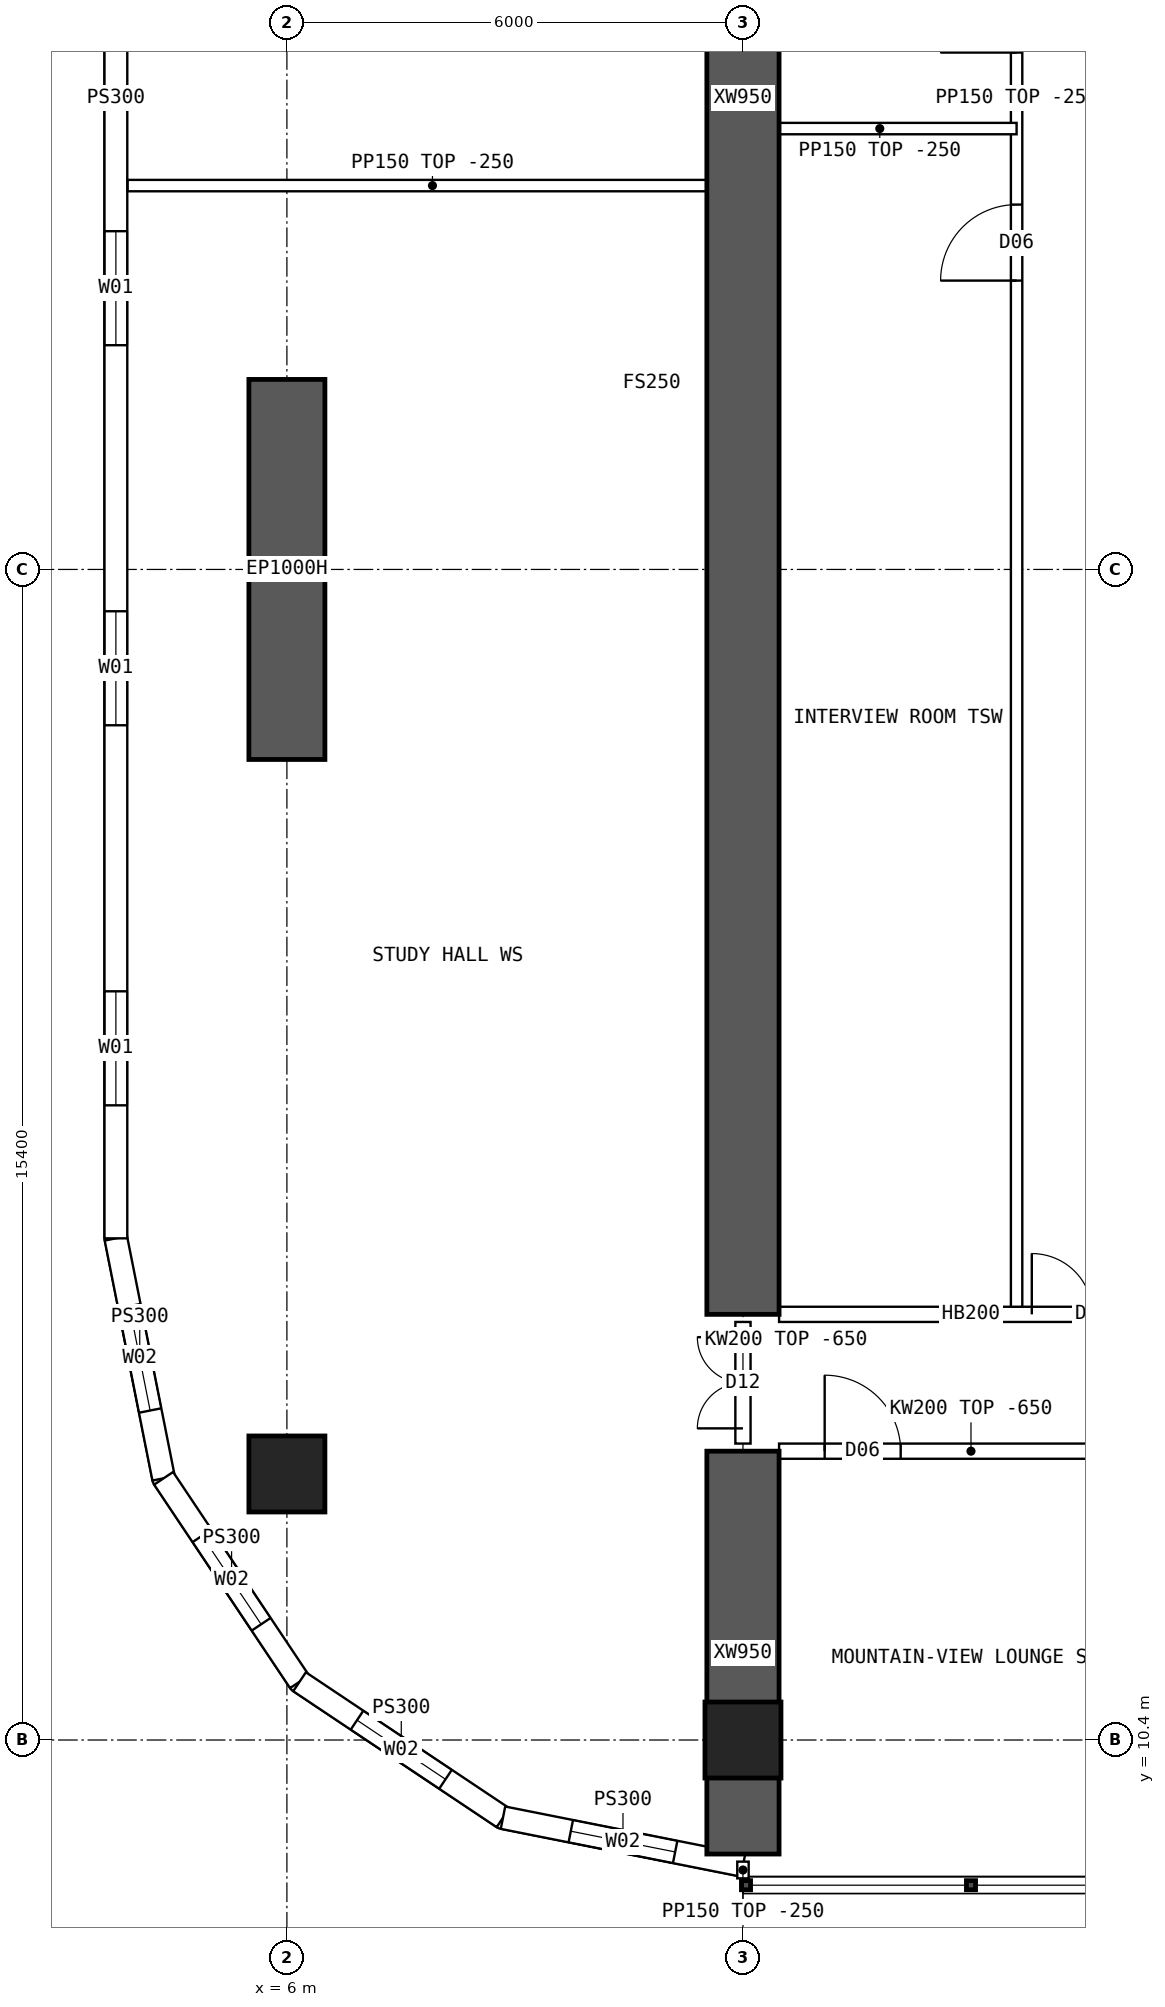
"""IFC4 building model, lengths in metres.
Left out: names, types, materials, properties, quantities, classifications, styles, units other than length and angle.
Written with IfcOpenShell. Run it as: python <this file> out.ifc"""

import sys

from ifc_helpers import new_model, si_unit, direction, frame, frame_2d, origin, origin_2d, place, context, subcontext, project, spatial, polyline, rectangle, hollow_rectangle, outline, extrude, element, fill, save


model = new_model("IFC4")
c1 = context("Model", 3, precision=1e-05, world=origin(), true_north=direction((0.0, 1.0)))
c2 = subcontext(c1, "Body", "Model", "MODEL_VIEW")
j1 = project(units=[si_unit("LENGTHUNIT", "METRE"), si_unit("PLANEANGLEUNIT", "RADIAN")], contexts=[c1])
p1 = place(None, origin())
s1 = spatial("IfcSite", under=j1, at=p1, CompositionType="ELEMENT")
p2 = place(p1, origin())
s2 = spatial("IfcBuilding", under=s1, at=p2, CompositionType="ELEMENT")
p3 = place(p2, frame((0.0, 0.0, 91.9)))
s3 = spatial("IfcBuildingStorey", under=s2, at=p3, CompositionType="ELEMENT", Elevation=91.9)
for number, where, z_axis, x_axis in (
    (1, (12.0, 10.4, 0.0), (0.0, 0.0, 1.0), (1.0, 0.0, 0.0)),
    (2, (6.0, 13.9, 0.0), (0.0, 0.0, 1.0), (1.0, 0.0, 0.0)),
):
    element("IfcColumn", number, at=place(p3, frame(where, z_axis=z_axis, x_axis=x_axis)), inside=s3, PredefinedType="COLUMN", context=c2, shape_type="SweptSolid", body=[
        extrude(hollow_rectangle(XDim=1.0, YDim=1.0, WallThickness=0.1, at=origin_2d()), origin(), (0.0, 0.0, 1.0), 3.75),
    ])
p4 = place(p3, frame((6.0, 23.3, 0.0), z_axis=(0.0, 0.0, 1.0), x_axis=(0.0, 1.0, 0.0)))
e3 = element("IfcWall", 3, at=p4, inside=s3, PredefinedType="SHEAR", context=c2, shape_type="SweptSolid", body=[
    extrude(rectangle(XDim=5.0, YDim=1.0, at=frame_2d((2.5, 0.0))), origin(), (0.0, 0.0, 1.0), 3.75),
])
p5 = place(p3, frame((12.0, 8.9, 0.0), z_axis=(0.0, 0.0, 1.0), x_axis=(0.0, 1.0, 0.0)))
e4 = element("IfcWall", 4, at=p5, inside=s3, PredefinedType="SHEAR", context=c2, shape_type="SweptSolid", body=[
    extrude(rectangle(XDim=5.3, YDim=0.95, at=frame_2d((2.65, 0.0))), origin(), (0.0, 0.0, 1.0), 3.75),
])
p6 = place(p3, frame((12.0, 16.0, 0.0), z_axis=(0.0, 0.0, 1.0), x_axis=(0.0, 1.0, 0.0)))
e5 = element("IfcWall", 5, at=p6, inside=s3, PredefinedType="SHEAR", context=c2, shape_type="SweptSolid", body=[
    extrude(rectangle(XDim=32.0, YDim=0.95, at=frame_2d((16.0, 0.0))), origin(), (0.0, 0.0, 1.0), 3.75),
])
p7 = place(p3, frame((3.75, 47.0, 0.0), z_axis=(0.0, 0.0, 1.0), x_axis=(0.0, -1.0, 0.0)))
e6 = element("IfcWall", 6, at=p7, inside=s3, PredefinedType="SOLIDWALL", context=c2, shape_type="SweptSolid", body=[
    extrude(outline(polyline([(-0.015, -0.15), (30.015, -0.15), (29.985, 0.15), (0.015, 0.15), (-0.015, -0.15)])), origin(), (0.0, 0.0, 1.0), 3.5),
])
p8 = place(p7, frame((1.75, 0.0, 0.9)))
e7 = element("IfcOpeningElement", 7, at=p8, cuts=e6, PredefinedType="OPENING", context=c2, shape_type="SweptSolid", body=[
    extrude(rectangle(XDim=1.5, YDim=2.0, at=frame_2d((0.75, 1.0))), frame((0.0, 0.16, 0.0), z_axis=(0.0, -1.0, 0.0), x_axis=(1.0, 0.0, 0.0)), (0.0, 0.0, 1.0), 0.32),
])
p9 = place(p7, frame((6.75, 0.0, 0.9)))
e8 = element("IfcOpeningElement", 8, at=p9, cuts=e6, PredefinedType="OPENING", context=c2, shape_type="SweptSolid", body=[
    extrude(rectangle(XDim=1.5, YDim=2.0, at=frame_2d((0.75, 1.0))), frame((0.0, 0.16, 0.0), z_axis=(0.0, -1.0, 0.0), x_axis=(1.0, 0.0, 0.0)), (0.0, 0.0, 1.0), 0.32),
])
p10 = place(p7, frame((11.75, 0.0, 0.9)))
e9 = element("IfcOpeningElement", 9, at=p10, cuts=e6, PredefinedType="OPENING", context=c2, shape_type="SweptSolid", body=[
    extrude(rectangle(XDim=1.5, YDim=2.0, at=frame_2d((0.75, 1.0))), frame((0.0, 0.16, 0.0), z_axis=(0.0, -1.0, 0.0), x_axis=(1.0, 0.0, 0.0)), (0.0, 0.0, 1.0), 0.32),
])
p11 = place(p7, frame((16.75, 0.0, 0.9)))
e10 = element("IfcOpeningElement", 10, at=p11, cuts=e6, PredefinedType="OPENING", context=c2, shape_type="SweptSolid", body=[
    extrude(rectangle(XDim=1.5, YDim=2.0, at=frame_2d((0.75, 1.0))), frame((0.0, 0.16, 0.0), z_axis=(0.0, -1.0, 0.0), x_axis=(1.0, 0.0, 0.0)), (0.0, 0.0, 1.0), 0.32),
])
p12 = place(p7, frame((21.75, 0.0, 0.9)))
e11 = element("IfcOpeningElement", 11, at=p12, cuts=e6, PredefinedType="OPENING", context=c2, shape_type="SweptSolid", body=[
    extrude(rectangle(XDim=1.5, YDim=2.0, at=frame_2d((0.75, 1.0))), frame((0.0, 0.16, 0.0), z_axis=(0.0, -1.0, 0.0), x_axis=(1.0, 0.0, 0.0)), (0.0, 0.0, 1.0), 0.32),
])
p13 = place(p7, frame((26.75, 0.0, 0.9)))
e12 = element("IfcOpeningElement", 12, at=p13, cuts=e6, PredefinedType="OPENING", context=c2, shape_type="SweptSolid", body=[
    extrude(rectangle(XDim=1.5, YDim=2.0, at=frame_2d((0.75, 1.0))), frame((0.0, 0.16, 0.0), z_axis=(0.0, -1.0, 0.0), x_axis=(1.0, 0.0, 0.0)), (0.0, 0.0, 1.0), 0.32),
])
p14 = place(p3, frame((3.75, 17.0, 0.0), z_axis=(0.0, 0.0, 1.0), x_axis=(0.195080412259, -0.980787251524, 0.0)))
e13 = element("IfcWall", 13, at=p14, inside=s3, PredefinedType="SOLIDWALL", context=c2, shape_type="SweptSolid", body=[
    extrude(outline(polyline([(-0.015, -0.15), (3.249, -0.15), (3.189, 0.15), (0.015, 0.15), (-0.015, -0.15)])), origin(), (0.0, 0.0, 1.0), 3.5),
])
p15 = place(p14, frame((0.909, 0.0, 0.9)))
e14 = element("IfcOpeningElement", 14, at=p15, cuts=e13, PredefinedType="OPENING", context=c2, shape_type="SweptSolid", body=[
    extrude(rectangle(XDim=1.4, YDim=1.8, at=frame_2d((0.7, 0.9))), frame((0.0, 0.16, 0.0), z_axis=(0.0, -1.0, 0.0), x_axis=(1.0, 0.0, 0.0)), (0.0, 0.0, 1.0), 0.32),
])
p16 = place(p3, frame((4.378, 13.843, 0.0), z_axis=(0.0, 0.0, 1.0), x_axis=(0.555609954424, -0.831443069936, 0.0)))
e15 = element("IfcWall", 15, at=p16, inside=s3, PredefinedType="SOLIDWALL", context=c2, shape_type="SweptSolid", body=[
    extrude(outline(polyline([(-0.03, -0.15), (3.249, -0.15), (3.189, 0.15), (0.03, 0.15), (-0.03, -0.15)])), origin(), (0.0, 0.0, 1.0), 3.5),
])
p17 = place(p16, frame((0.909, 0.0, 0.9)))
e16 = element("IfcOpeningElement", 16, at=p17, cuts=e15, PredefinedType="OPENING", context=c2, shape_type="SweptSolid", body=[
    extrude(rectangle(XDim=1.4, YDim=1.8, at=frame_2d((0.7, 0.9))), frame((0.0, 0.16, 0.0), z_axis=(0.0, -1.0, 0.0), x_axis=(1.0, 0.0, 0.0)), (0.0, 0.0, 1.0), 0.32),
])
p18 = place(p3, frame((6.167, 11.167, 0.0), z_axis=(0.0, 0.0, 1.0), x_axis=(0.831443069936, -0.555609954424, 0.0)))
e17 = element("IfcWall", 17, at=p18, inside=s3, PredefinedType="SOLIDWALL", context=c2, shape_type="SweptSolid", body=[
    extrude(outline(polyline([(-0.03, -0.15), (3.249, -0.15), (3.189, 0.15), (0.03, 0.15), (-0.03, -0.15)])), origin(), (0.0, 0.0, 1.0), 3.5),
])
p19 = place(p18, frame((0.909, 0.0, 0.9)))
e18 = element("IfcOpeningElement", 18, at=p19, cuts=e17, PredefinedType="OPENING", context=c2, shape_type="SweptSolid", body=[
    extrude(rectangle(XDim=1.4, YDim=1.8, at=frame_2d((0.7, 0.9))), frame((0.0, 0.16, 0.0), z_axis=(0.0, -1.0, 0.0), x_axis=(1.0, 0.0, 0.0)), (0.0, 0.0, 1.0), 0.32),
])
p20 = place(p3, frame((8.843, 9.378, 0.0), z_axis=(0.0, 0.0, 1.0), x_axis=(0.980787251524, -0.195080412259, 0.0)))
e19 = element("IfcWall", 19, at=p20, inside=s3, PredefinedType="SOLIDWALL", context=c2, shape_type="SweptSolid", body=[
    extrude(outline(polyline([(-0.03, -0.15), (3.249, -0.15), (3.189, 0.15), (0.03, 0.15), (-0.03, -0.15)])), origin(), (0.0, 0.0, 1.0), 3.5),
])
p21 = place(p20, frame((0.909, 0.0, 0.9)))
e20 = element("IfcOpeningElement", 20, at=p21, cuts=e19, PredefinedType="OPENING", context=c2, shape_type="SweptSolid", body=[
    extrude(rectangle(XDim=1.4, YDim=1.8, at=frame_2d((0.7, 0.9))), frame((0.0, 0.16, 0.0), z_axis=(0.0, -1.0, 0.0), x_axis=(1.0, 0.0, 0.0)), (0.0, 0.0, 1.0), 0.32),
])
p22 = place(p3, frame((12.475, 14.2, 0.0), z_axis=(0.0, 0.0, 1.0), x_axis=(1.0, 0.0, 0.0)))
e21 = element("IfcWall", 21, at=p22, inside=s3, PredefinedType="SOLIDWALL", context=c2, shape_type="SweptSolid", body=[
    extrude(outline(polyline([(0.0, 0.0), (5.05, 0.0), (5.05, 3.1), (0.0, 3.1), (0.0, 0.0)])), frame((0.0, 0.1, 0.0), z_axis=(0.0, -1.0, 0.0), x_axis=(1.0, 0.0, 0.0)), (0.0, 0.0, 1.0), 0.2),
])
p23 = place(p22, frame((0.6, 0.0, 0.0)))
e22 = element("IfcOpeningElement", 22, at=p23, cuts=e21, PredefinedType="OPENING", context=c2, shape_type="SweptSolid", body=[
    extrude(rectangle(XDim=1.0, YDim=2.1, at=frame_2d((0.5, 1.05))), frame((0.0, 0.11, 0.0), z_axis=(0.0, -1.0, 0.0), x_axis=(1.0, 0.0, 0.0)), (0.0, 0.0, 1.0), 0.22),
])
p24 = place(p3, frame((12.475, 16.0, 0.0), z_axis=(0.0, 0.0, 1.0), x_axis=(1.0, 0.0, 0.0)))
e23 = element("IfcWall", 23, at=p24, inside=s3, PredefinedType="SOLIDWALL", context=c2, shape_type="SweptSolid", body=[
    extrude(rectangle(XDim=5.05, YDim=0.2, at=frame_2d((2.525, 0.0))), origin(), (0.0, 0.0, 1.0), 3.5),
])
p25 = place(p24, frame((3.325, 0.0, 0.0)))
e24 = element("IfcOpeningElement", 24, at=p25, cuts=e23, PredefinedType="OPENING", context=c2, shape_type="SweptSolid", body=[
    extrude(rectangle(XDim=1.6, YDim=2.1, at=frame_2d((0.8, 1.05))), frame((0.0, 0.11, 0.0), z_axis=(0.0, -1.0, 0.0), x_axis=(1.0, 0.0, 0.0)), (0.0, 0.0, 1.0), 0.22),
])
p26 = place(p3, frame((15.6, 16.1, 0.0), z_axis=(0.0, 0.0, 1.0), x_axis=(0.0, 1.0, 0.0)))
e25 = element("IfcWall", 25, at=p26, inside=s3, PredefinedType="PARTITIONING", context=c2, shape_type="SweptSolid", body=[
    extrude(rectangle(XDim=31.8, YDim=0.15, at=frame_2d((15.9, 0.0))), origin(), (0.0, 0.0, 1.0), 3.5),
])
p27 = place(p26, frame((13.5, 0.0, 0.0)))
e26 = element("IfcOpeningElement", 26, at=p27, cuts=e25, PredefinedType="OPENING", context=c2, shape_type="SweptSolid", body=[
    extrude(rectangle(XDim=1.0, YDim=2.1, at=frame_2d((0.5, 1.05))), frame((0.0, 0.085, 0.0), z_axis=(0.0, -1.0, 0.0), x_axis=(1.0, 0.0, 0.0)), (0.0, 0.0, 1.0), 0.17),
])
p28 = place(p26, frame((16.5, 0.0, 0.0)))
e27 = element("IfcOpeningElement", 27, at=p28, cuts=e25, PredefinedType="OPENING", context=c2, shape_type="SweptSolid", body=[
    extrude(rectangle(XDim=1.0, YDim=2.1, at=frame_2d((0.5, 1.05))), frame((0.0, 0.085, 0.0), z_axis=(0.0, -1.0, 0.0), x_axis=(1.0, 0.0, 0.0)), (0.0, 0.0, 1.0), 0.17),
])
p29 = place(p3, frame((12.0, 31.6, 0.0), z_axis=(0.0, 0.0, 1.0), x_axis=(1.0, 0.0, 0.0)))
e28 = element("IfcWall", 28, at=p29, inside=s3, PredefinedType="PARTITIONING", context=c2, shape_type="SweptSolid", body=[
    extrude(rectangle(XDim=3.6, YDim=0.15, at=frame_2d((1.8, 0.0))), origin(), (0.0, 0.0, 1.0), 3.5),
])
p30 = place(p3, frame((3.905, 30.85, 0.0), z_axis=(0.0, 0.0, 1.0), x_axis=(1.0, 0.0, 0.0)))
e29 = element("IfcWall", 29, at=p30, inside=s3, PredefinedType="PARTITIONING", context=c2, shape_type="SweptSolid", body=[
    extrude(outline(polyline([(0.0, 0.0), (8.02, 0.0), (8.02, 3.5), (2.397, 3.5), (2.395, 3.05), (1.797, 3.05), (1.795, 3.5), (0.0, 3.5), (0.0, 0.0)])), frame((0.0, 0.075, 0.0), z_axis=(0.0, -1.0, 0.0), x_axis=(1.0, 0.0, 0.0)), (0.0, 0.0, 1.0), 0.15),
])
p31 = place(p3, frame((12.0, 14.3, 0.0), z_axis=(0.0, 0.0, 1.0), x_axis=(0.0, 1.0, 0.0)))
e30 = element("IfcWall", 30, at=p31, inside=s3, PredefinedType="SOLIDWALL", context=c2, shape_type="SweptSolid", body=[
    extrude(outline(polyline([(0.0, 0.0), (1.6, 0.0), (1.6, 3.1), (0.0, 3.1), (0.0, 0.0)])), frame((0.0, 0.1, 0.0), z_axis=(0.0, -1.0, 0.0), x_axis=(1.0, 0.0, 0.0)), (0.0, 0.0, 1.0), 0.2),
])
p32 = place(p31, frame((0.2, 0.0, 0.0)))
e31 = element("IfcOpeningElement", 31, at=p32, cuts=e30, PredefinedType="OPENING", context=c2, shape_type="SweptSolid", body=[
    extrude(rectangle(XDim=1.2, YDim=2.1, at=frame_2d((0.6, 1.05))), frame((0.0, 0.11, 0.0), z_axis=(0.0, -1.0, 0.0), x_axis=(1.0, 0.0, 0.0)), (0.0, 0.0, 1.0), 0.22),
])
p33 = place(p3, frame((12.0, 8.8, 0.0), z_axis=(0.0, 0.0, 1.0), x_axis=(0.0, -1.0, 0.0)))
e32 = element("IfcWall", 32, at=p33, inside=s3, PredefinedType="PARTITIONING", context=c2, shape_type="SweptSolid", body=[
    extrude(rectangle(XDim=0.22, YDim=0.15, at=frame_2d((0.11, 0.0))), origin(), (0.0, 0.0, 1.0), 3.5),
])
p34 = place(p11, origin())
e33 = element("IfcWindow", 33, at=p34, inside=s3, PartitioningType="SINGLE_PANEL", PredefinedType="WINDOW", context=c2, shape_type="SweptSolid", body=[
    extrude(rectangle(XDim=1.5, YDim=2.0, at=frame_2d((0.75, 1.0))), frame((0.0, 0.03, 0.0), z_axis=(0.0, -1.0, 0.0), x_axis=(1.0, 0.0, 0.0)), (0.0, 0.0, 1.0), 0.06),
])
fill(e10, e33)
p35 = place(p12, origin())
e34 = element("IfcWindow", 34, at=p35, inside=s3, PartitioningType="SINGLE_PANEL", PredefinedType="WINDOW", context=c2, shape_type="SweptSolid", body=[
    extrude(rectangle(XDim=1.5, YDim=2.0, at=frame_2d((0.75, 1.0))), frame((0.0, 0.03, 0.0), z_axis=(0.0, -1.0, 0.0), x_axis=(1.0, 0.0, 0.0)), (0.0, 0.0, 1.0), 0.06),
])
fill(e11, e34)
p36 = place(p13, origin())
e35 = element("IfcWindow", 35, at=p36, inside=s3, PartitioningType="SINGLE_PANEL", PredefinedType="WINDOW", context=c2, shape_type="SweptSolid", body=[
    extrude(rectangle(XDim=1.5, YDim=2.0, at=frame_2d((0.75, 1.0))), frame((0.0, 0.03, 0.0), z_axis=(0.0, -1.0, 0.0), x_axis=(1.0, 0.0, 0.0)), (0.0, 0.0, 1.0), 0.06),
])
fill(e12, e35)
p37 = place(p15, origin())
e36 = element("IfcWindow", 36, at=p37, inside=s3, PartitioningType="SINGLE_PANEL", PredefinedType="WINDOW", context=c2, shape_type="SweptSolid", body=[
    extrude(rectangle(XDim=1.4, YDim=1.8, at=frame_2d((0.7, 0.9))), frame((0.0, 0.03, 0.0), z_axis=(0.0, -1.0, 0.0), x_axis=(1.0, 0.0, 0.0)), (0.0, 0.0, 1.0), 0.06),
])
fill(e14, e36)
p38 = place(p17, origin())
e37 = element("IfcWindow", 37, at=p38, inside=s3, PartitioningType="SINGLE_PANEL", PredefinedType="WINDOW", context=c2, shape_type="SweptSolid", body=[
    extrude(rectangle(XDim=1.4, YDim=1.8, at=frame_2d((0.7, 0.9))), frame((0.0, 0.03, 0.0), z_axis=(0.0, -1.0, 0.0), x_axis=(1.0, 0.0, 0.0)), (0.0, 0.0, 1.0), 0.06),
])
fill(e16, e37)
p39 = place(p19, origin())
e38 = element("IfcWindow", 38, at=p39, inside=s3, PartitioningType="SINGLE_PANEL", PredefinedType="WINDOW", context=c2, shape_type="SweptSolid", body=[
    extrude(rectangle(XDim=1.4, YDim=1.8, at=frame_2d((0.7, 0.9))), frame((0.0, 0.03, 0.0), z_axis=(0.0, -1.0, 0.0), x_axis=(1.0, 0.0, 0.0)), (0.0, 0.0, 1.0), 0.06),
])
fill(e18, e38)
p40 = place(p21, origin())
e39 = element("IfcWindow", 39, at=p40, inside=s3, PartitioningType="SINGLE_PANEL", PredefinedType="WINDOW", context=c2, shape_type="SweptSolid", body=[
    extrude(rectangle(XDim=1.4, YDim=1.8, at=frame_2d((0.7, 0.9))), frame((0.0, 0.03, 0.0), z_axis=(0.0, -1.0, 0.0), x_axis=(1.0, 0.0, 0.0)), (0.0, 0.0, 1.0), 0.06),
])
fill(e20, e39)
p41 = place(p25, origin())
e40 = element("IfcDoor", 40, at=p41, inside=s3, OperationType="DOUBLE_DOOR_SINGLE_SWING", PredefinedType="DOOR", context=c2, shape_type="SweptSolid", body=[
    extrude(rectangle(XDim=1.6, YDim=2.1, at=frame_2d((0.8, 1.05))), frame((0.0, 0.025, 0.0), z_axis=(0.0, -1.0, 0.0), x_axis=(1.0, 0.0, 0.0)), (0.0, 0.0, 1.0), 0.05),
])
fill(e24, e40)
p42 = place(p23, origin())
e41 = element("IfcDoor", 41, at=p42, inside=s3, OperationType="SINGLE_SWING_LEFT", PredefinedType="DOOR", context=c2, shape_type="SweptSolid", body=[
    extrude(rectangle(XDim=1.0, YDim=2.1, at=frame_2d((0.5, 1.05))), frame((0.0, 0.025, 0.0), z_axis=(0.0, -1.0, 0.0), x_axis=(1.0, 0.0, 0.0)), (0.0, 0.0, 1.0), 0.05),
])
fill(e22, e41)
p43 = place(p27, origin())
e42 = element("IfcDoor", 42, at=p43, inside=s3, OperationType="SINGLE_SWING_LEFT", PredefinedType="DOOR", context=c2, shape_type="SweptSolid", body=[
    extrude(rectangle(XDim=1.0, YDim=2.1, at=frame_2d((0.5, 1.05))), frame((0.0, 0.025, 0.0), z_axis=(0.0, -1.0, 0.0), x_axis=(1.0, 0.0, 0.0)), (0.0, 0.0, 1.0), 0.05),
])
fill(e26, e42)
p44 = place(p32, origin())
e43 = element("IfcDoor", 43, at=p44, inside=s3, OperationType="DOUBLE_DOOR_SINGLE_SWING", PredefinedType="DOOR", context=c2, shape_type="SweptSolid", body=[
    extrude(rectangle(XDim=1.2, YDim=2.1, at=frame_2d((0.6, 1.05))), frame((0.0, 0.025, 0.0), z_axis=(0.0, -1.0, 0.0), x_axis=(1.0, 0.0, 0.0)), (0.0, 0.0, 1.0), 0.05),
])
fill(e31, e43)
save(model, sys.argv[1])
